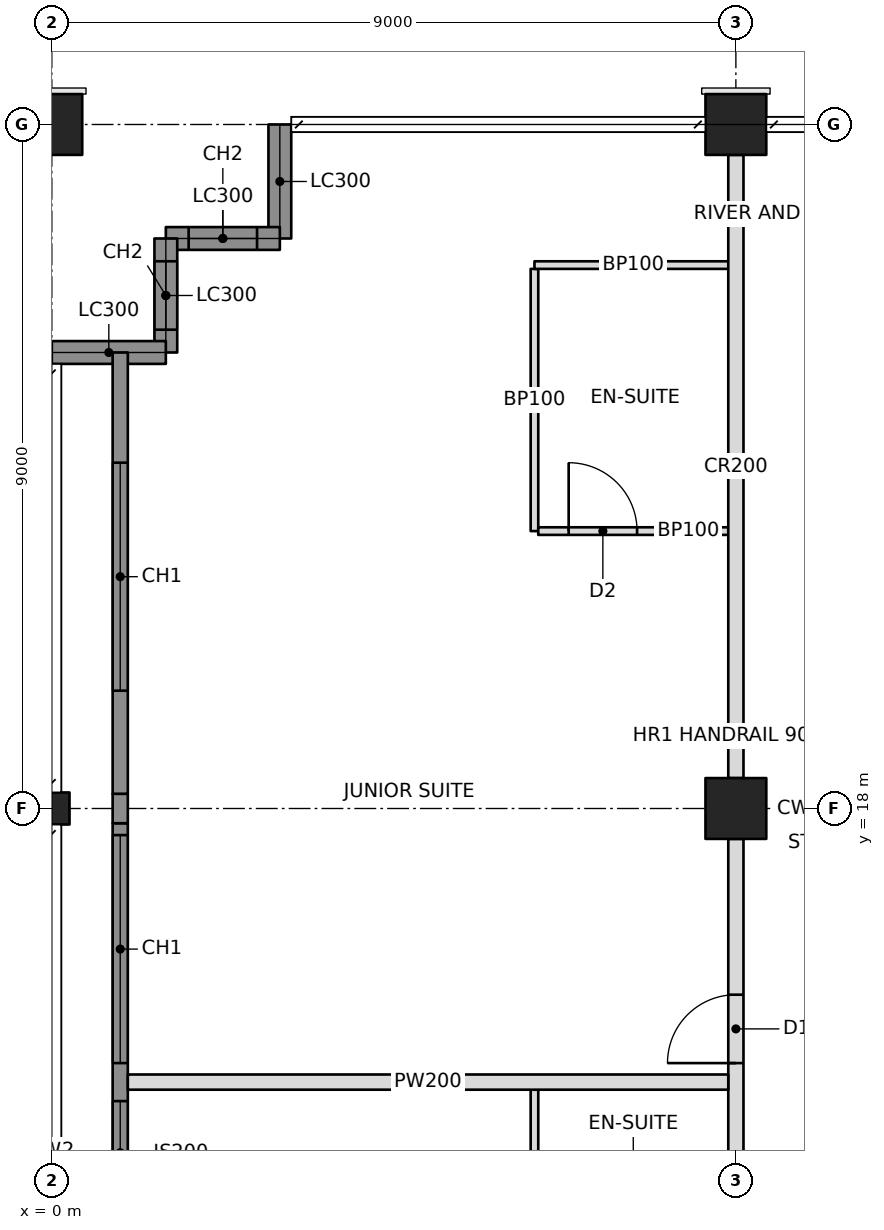
"""IFC4 building model, lengths in metres.
Left out: names, types, materials, properties, quantities, classifications, styles, units other than length and angle.
Written with IfcOpenShell. Run it as: python <this file> out.ifc"""

import sys

from ifc_helpers import new_model, si_unit, direction, frame, frame_2d, origin, origin_2d, place, context, subcontext, project, spatial, rectangle, hollow_rectangle, i_section, extrude, element, fill, save


model = new_model("IFC4")
c1 = context("Model", 3, precision=1e-05, world=origin(), true_north=direction((0.0, 1.0)))
c2 = subcontext(c1, "Body", "Model", "MODEL_VIEW")
j1 = project(units=[si_unit("LENGTHUNIT", "METRE"), si_unit("PLANEANGLEUNIT", "RADIAN")], contexts=[c1])
p1 = place(None, origin())
s1 = spatial("IfcSite", under=j1, at=p1, CompositionType="ELEMENT")
p2 = place(p1, origin())
s2 = spatial("IfcBuilding", under=s1, at=p2, CompositionType="ELEMENT")
p3 = place(p2, frame((0.0, 0.0, 241.0)))
s3 = spatial("IfcBuildingStorey", under=s2, at=p3, CompositionType="ELEMENT", Elevation=241.0)
p4 = place(p3, frame((0.0, 18.0, 0.0), z_axis=(0.0, 0.0, 1.0), x_axis=(0.0, 1.0, 0.0)))
e1 = element("IfcColumn", 1, at=p4, inside=s3, PredefinedType="COLUMN", context=c2, shape_type="SweptSolid", body=[
    extrude(i_section(OverallWidth=0.422, OverallDepth=0.465, WebThickness=0.045, FlangeThickness=0.073, at=origin_2d()), origin(), (0.0, 0.0, 1.0), 3.6),
])
p5 = place(p3, frame((0.0, 27.0, 0.0), z_axis=(0.0, 0.0, 1.0), x_axis=(0.0, 1.0, 0.0)))
e2 = element("IfcColumn", 2, at=p5, inside=s3, PredefinedType="COLUMN", context=c2, shape_type="SweptSolid", body=[
    extrude(hollow_rectangle(XDim=0.8, YDim=0.8, WallThickness=0.05, at=origin_2d()), origin(), (0.0, 0.0, 1.0), 3.6),
])
p6 = place(p3, frame((9.0, 18.0, 0.0), z_axis=(0.0, 0.0, 1.0), x_axis=(1.0, 0.0, 0.0)))
e3 = element("IfcColumn", 3, at=p6, inside=s3, PredefinedType="COLUMN", context=c2, shape_type="SweptSolid", body=[
    extrude(hollow_rectangle(XDim=0.8, YDim=0.8, WallThickness=0.04, at=origin_2d()), origin(), (0.0, 0.0, 1.0), 3.6),
])
p7 = place(p3, frame((9.0, 27.0, 0.0), z_axis=(0.0, 0.0, 1.0), x_axis=(1.0, 0.0, 0.0)))
e4 = element("IfcColumn", 4, at=p7, inside=s3, PredefinedType="COLUMN", context=c2, shape_type="SweptSolid", body=[
    extrude(hollow_rectangle(XDim=0.8, YDim=0.8, WallThickness=0.05, at=origin_2d()), origin(), (0.0, 0.0, 1.0), 3.6),
])
p8 = place(p3, frame((3.0, 27.0, 0.0), z_axis=(0.0, 0.0, 1.0), x_axis=(0.0, -1.0, 0.0)))
e5 = element("IfcWall", 5, at=p8, inside=s3, PredefinedType="SOLIDWALL", context=c2, shape_type="SweptSolid", body=[
    extrude(rectangle(XDim=1.5, YDim=0.3, at=frame_2d((0.75, 0.0))), origin(), (0.0, 0.0, 1.0), 2.62),
])
p9 = place(p3, frame((3.0, 25.5, 0.0), z_axis=(0.0, 0.0, 1.0), x_axis=(-1.0, 0.0, 0.0)))
e6 = element("IfcWall", 6, at=p9, inside=s3, PredefinedType="SOLIDWALL", context=c2, shape_type="SweptSolid", body=[
    extrude(rectangle(XDim=1.5, YDim=0.3, at=frame_2d((0.75, 0.0))), origin(), (0.0, 0.0, 1.0), 3.4),
])
p10 = place(p9, frame((0.3, 0.0, 0.6)))
e7 = element("IfcOpeningElement", 7, at=p10, cuts=e6, PredefinedType="OPENING", context=c2, shape_type="SweptSolid", body=[
    extrude(rectangle(XDim=0.9, YDim=2.2, at=frame_2d((0.45, 1.1))), frame((0.0, 0.16, 0.0), z_axis=(0.0, -1.0, 0.0), x_axis=(1.0, 0.0, 0.0)), (0.0, 0.0, 1.0), 0.32),
])
p11 = place(p3, frame((1.5, 25.5, 0.0), z_axis=(0.0, 0.0, 1.0), x_axis=(0.0, -1.0, 0.0)))
e8 = element("IfcWall", 8, at=p11, inside=s3, PredefinedType="SOLIDWALL", context=c2, shape_type="SweptSolid", body=[
    extrude(rectangle(XDim=1.5, YDim=0.3, at=frame_2d((0.75, 0.0))), origin(), (0.0, 0.0, 1.0), 3.4),
])
p12 = place(p11, frame((0.3, 0.0, 0.6)))
e9 = element("IfcOpeningElement", 9, at=p12, cuts=e8, PredefinedType="OPENING", context=c2, shape_type="SweptSolid", body=[
    extrude(rectangle(XDim=0.9, YDim=2.2, at=frame_2d((0.45, 1.1))), frame((0.0, 0.16, 0.0), z_axis=(0.0, -1.0, 0.0), x_axis=(1.0, 0.0, 0.0)), (0.0, 0.0, 1.0), 0.32),
])
p13 = place(p3, frame((1.5, 24.0, 0.0), z_axis=(0.0, 0.0, 1.0), x_axis=(-1.0, 0.0, 0.0)))
e10 = element("IfcWall", 10, at=p13, inside=s3, PredefinedType="SOLIDWALL", context=c2, shape_type="SweptSolid", body=[
    extrude(rectangle(XDim=1.5, YDim=0.3, at=frame_2d((0.75, 0.0))), origin(), (0.0, 0.0, 1.0), 2.62),
])
p14 = place(p3, frame((9.0, 10.8, 0.0), z_axis=(0.0, 0.0, 1.0), x_axis=(0.0, 1.0, 0.0)))
e11 = element("IfcWall", 11, at=p14, inside=s3, PredefinedType="PARTITIONING", context=c2, shape_type="SweptSolid", body=[
    extrude(rectangle(XDim=6.8, YDim=0.2, at=frame_2d((3.4, 0.0))), origin(), (0.0, 0.0, 1.0), 2.605),
])
p15 = place(p14, frame((0.25, 0.0, 0.0)))
e12 = element("IfcOpeningElement", 12, at=p15, cuts=e11, PredefinedType="OPENING", context=c2, shape_type="SweptSolid", body=[
    extrude(rectangle(XDim=0.9, YDim=2.1, at=frame_2d((0.45, 1.05))), frame((0.0, 0.11, 0.0), z_axis=(0.0, -1.0, 0.0), x_axis=(1.0, 0.0, 0.0)), (0.0, 0.0, 1.0), 0.22),
])
p16 = place(p14, frame((3.85, 0.0, 0.0)))
e13 = element("IfcOpeningElement", 13, at=p16, cuts=e11, PredefinedType="OPENING", context=c2, shape_type="SweptSolid", body=[
    extrude(rectangle(XDim=0.9, YDim=2.1, at=frame_2d((0.45, 1.05))), frame((0.0, 0.11, 0.0), z_axis=(0.0, -1.0, 0.0), x_axis=(1.0, 0.0, 0.0)), (0.0, 0.0, 1.0), 0.22),
])
p17 = place(p3, frame((9.0, 18.4, 0.0), z_axis=(0.0, 0.0, 1.0), x_axis=(0.0, 1.0, 0.0)))
e14 = element("IfcWall", 14, at=p17, inside=s3, PredefinedType="PARTITIONING", context=c2, shape_type="SweptSolid", body=[
    extrude(rectangle(XDim=8.2, YDim=0.2, at=frame_2d((4.1, 0.0))), origin(), (0.0, 0.0, 1.0), 2.605),
])
p18 = place(p3, frame((8.9, 14.4, 0.0), z_axis=(0.0, 0.0, 1.0), x_axis=(-1.0, 0.0, 0.0)))
e15 = element("IfcWall", 15, at=p18, inside=s3, PredefinedType="PARTITIONING", context=c2, shape_type="SweptSolid", body=[
    extrude(rectangle(XDim=7.9, YDim=0.2, at=frame_2d((3.95, 0.0))), origin(), (0.0, 0.0, 1.0), 2.604),
])
p19 = place(p3, frame((6.35, 12.25, 0.0), z_axis=(0.0, 0.0, 1.0), x_axis=(0.0, 1.0, 0.0)))
e16 = element("IfcWall", 16, at=p19, inside=s3, PredefinedType="PARTITIONING", context=c2, shape_type="SweptSolid", body=[
    extrude(rectangle(XDim=2.05, YDim=0.1, at=frame_2d((1.025, 0.0))), origin(), (0.0, 0.0, 1.0), 3.4),
])
p20 = place(p3, frame((6.35, 21.65, 0.0), z_axis=(0.0, 0.0, 1.0), x_axis=(0.0, 1.0, 0.0)))
e17 = element("IfcWall", 17, at=p20, inside=s3, PredefinedType="PARTITIONING", context=c2, shape_type="SweptSolid", body=[
    extrude(rectangle(XDim=3.45, YDim=0.1, at=frame_2d((1.725, 0.0))), origin(), (0.0, 0.0, 1.0), 3.4),
])
p21 = place(p3, frame((8.9, 21.65, 0.0), z_axis=(0.0, 0.0, 1.0), x_axis=(-1.0, 0.0, 0.0)))
e18 = element("IfcWall", 18, at=p21, inside=s3, PredefinedType="PARTITIONING", context=c2, shape_type="SweptSolid", body=[
    extrude(rectangle(XDim=2.5, YDim=0.1, at=frame_2d((1.25, 0.0))), origin(), (0.0, 0.0, 1.0), 2.604),
])
p22 = place(p21, frame((1.2, 0.0, 0.0)))
e19 = element("IfcOpeningElement", 19, at=p22, cuts=e18, PredefinedType="OPENING", context=c2, shape_type="SweptSolid", body=[
    extrude(rectangle(XDim=0.9, YDim=2.1, at=frame_2d((0.45, 1.05))), frame((0.0, 0.06, 0.0), z_axis=(0.0, -1.0, 0.0), x_axis=(1.0, 0.0, 0.0)), (0.0, 0.0, 1.0), 0.12),
])
p23 = place(p3, frame((6.35, 25.15, 0.0), z_axis=(0.0, 0.0, 1.0), x_axis=(1.0, 0.0, 0.0)))
e20 = element("IfcWall", 20, at=p23, inside=s3, PredefinedType="PARTITIONING", context=c2, shape_type="SweptSolid", body=[
    extrude(rectangle(XDim=2.6, YDim=0.1, at=frame_2d((1.3, 0.0))), origin(), (0.0, 0.0, 1.0), 2.604),
])
p24 = place(p3, frame((0.9, 9.135, 0.0), z_axis=(0.0, 0.0, 1.0), x_axis=(0.0, 1.0, 0.0)))
e21 = element("IfcWall", 21, at=p24, inside=s3, PredefinedType="SOLIDWALL", context=c2, shape_type="SweptSolid", body=[
    extrude(rectangle(XDim=8.671, YDim=0.2, at=frame_2d((4.335, 0.0))), origin(), (0.0, 0.0, 1.0), 3.4),
])
p25 = place(p24, frame((2.015, 0.0, 0.6)))
e22 = element("IfcOpeningElement", 22, at=p25, cuts=e21, PredefinedType="OPENING", context=c2, shape_type="SweptSolid", body=[
    extrude(rectangle(XDim=3.0, YDim=2.2, at=frame_2d((1.5, 1.1))), frame((0.0, 0.11, 0.0), z_axis=(0.0, -1.0, 0.0), x_axis=(1.0, 0.0, 0.0)), (0.0, 0.0, 1.0), 0.22),
])
p26 = place(p24, frame((5.515, 0.0, 0.6)))
e23 = element("IfcOpeningElement", 23, at=p26, cuts=e21, PredefinedType="OPENING", context=c2, shape_type="SweptSolid", body=[
    extrude(rectangle(XDim=3.0, YDim=2.2, at=frame_2d((1.5, 1.1))), frame((0.0, 0.11, 0.0), z_axis=(0.0, -1.0, 0.0), x_axis=(1.0, 0.0, 0.0)), (0.0, 0.0, 1.0), 0.22),
])
p27 = place(p3, frame((0.9, 17.806, 0.0), z_axis=(0.0, 0.0, 1.0), x_axis=(0.0, 1.0, 0.0)))
e24 = element("IfcWall", 24, at=p27, inside=s3, PredefinedType="SOLIDWALL", context=c2, shape_type="SweptSolid", body=[
    extrude(rectangle(XDim=0.388, YDim=0.2, at=frame_2d((0.194, 0.0))), origin(), (0.0, 0.0, 1.0), 2.604),
])
p28 = place(p3, frame((0.9, 18.194, 0.0), z_axis=(0.0, 0.0, 1.0), x_axis=(0.0, 1.0, 0.0)))
e25 = element("IfcWall", 25, at=p28, inside=s3, PredefinedType="SOLIDWALL", context=c2, shape_type="SweptSolid", body=[
    extrude(rectangle(XDim=5.806, YDim=0.2, at=frame_2d((2.903, 0.0))), origin(), (0.0, 0.0, 1.0), 3.4),
])
p29 = place(p28, frame((1.356, 0.0, 0.6)))
e26 = element("IfcOpeningElement", 26, at=p29, cuts=e25, PredefinedType="OPENING", context=c2, shape_type="SweptSolid", body=[
    extrude(rectangle(XDim=3.0, YDim=2.2, at=frame_2d((1.5, 1.1))), frame((0.0, 0.11, 0.0), z_axis=(0.0, -1.0, 0.0), x_axis=(1.0, 0.0, 0.0)), (0.0, 0.0, 1.0), 0.22),
])
p30 = place(p10, origin())
e27 = element("IfcWindow", 27, at=p30, inside=s3, PartitioningType="SINGLE_PANEL", PredefinedType="WINDOW", context=c2, shape_type="SweptSolid", body=[
    extrude(rectangle(XDim=0.9, YDim=2.2, at=frame_2d((0.45, 1.1))), frame((0.0, 0.03, 0.0), z_axis=(0.0, -1.0, 0.0), x_axis=(1.0, 0.0, 0.0)), (0.0, 0.0, 1.0), 0.06),
])
fill(e7, e27)
p31 = place(p12, origin())
e28 = element("IfcWindow", 28, at=p31, inside=s3, PartitioningType="SINGLE_PANEL", PredefinedType="WINDOW", context=c2, shape_type="SweptSolid", body=[
    extrude(rectangle(XDim=0.9, YDim=2.2, at=frame_2d((0.45, 1.1))), frame((0.0, 0.03, 0.0), z_axis=(0.0, -1.0, 0.0), x_axis=(1.0, 0.0, 0.0)), (0.0, 0.0, 1.0), 0.06),
])
fill(e9, e28)
p32 = place(p25, origin())
e29 = element("IfcWindow", 29, at=p32, inside=s3, PartitioningType="TRIPLE_PANEL_VERTICAL", PredefinedType="WINDOW", context=c2, shape_type="SweptSolid", body=[
    extrude(rectangle(XDim=3.0, YDim=2.2, at=frame_2d((1.5, 1.1))), frame((0.0, 0.03, 0.0), z_axis=(0.0, -1.0, 0.0), x_axis=(1.0, 0.0, 0.0)), (0.0, 0.0, 1.0), 0.06),
])
fill(e22, e29)
p33 = place(p26, origin())
e30 = element("IfcWindow", 30, at=p33, inside=s3, PartitioningType="TRIPLE_PANEL_VERTICAL", PredefinedType="WINDOW", context=c2, shape_type="SweptSolid", body=[
    extrude(rectangle(XDim=3.0, YDim=2.2, at=frame_2d((1.5, 1.1))), frame((0.0, 0.03, 0.0), z_axis=(0.0, -1.0, 0.0), x_axis=(1.0, 0.0, 0.0)), (0.0, 0.0, 1.0), 0.06),
])
fill(e23, e30)
p34 = place(p29, origin())
e31 = element("IfcWindow", 31, at=p34, inside=s3, PartitioningType="TRIPLE_PANEL_VERTICAL", PredefinedType="WINDOW", context=c2, shape_type="SweptSolid", body=[
    extrude(rectangle(XDim=3.0, YDim=2.2, at=frame_2d((1.5, 1.1))), frame((0.0, 0.03, 0.0), z_axis=(0.0, -1.0, 0.0), x_axis=(1.0, 0.0, 0.0)), (0.0, 0.0, 1.0), 0.06),
])
fill(e26, e31)
p35 = place(p22, frame((0.9, 0.0, 0.0), z_axis=(0.0, 0.0, 1.0), x_axis=(-1.0, 0.0, 0.0)))
e32 = element("IfcDoor", 32, at=p35, inside=s3, OperationType="SINGLE_SWING_LEFT", PredefinedType="DOOR", context=c2, shape_type="SweptSolid", body=[
    extrude(rectangle(XDim=0.9, YDim=2.1, at=frame_2d((0.45, 1.05))), frame((0.0, 0.025, 0.0), z_axis=(0.0, -1.0, 0.0), x_axis=(1.0, 0.0, 0.0)), (0.0, 0.0, 1.0), 0.05),
])
fill(e19, e32)
p36 = place(p16, origin())
e33 = element("IfcDoor", 33, at=p36, inside=s3, OperationType="SINGLE_SWING_LEFT", PredefinedType="DOOR", context=c2, shape_type="SweptSolid", body=[
    extrude(rectangle(XDim=0.9, YDim=2.1, at=frame_2d((0.45, 1.05))), frame((0.0, 0.025, 0.0), z_axis=(0.0, -1.0, 0.0), x_axis=(1.0, 0.0, 0.0)), (0.0, 0.0, 1.0), 0.05),
])
fill(e13, e33)
save(model, sys.argv[1])
